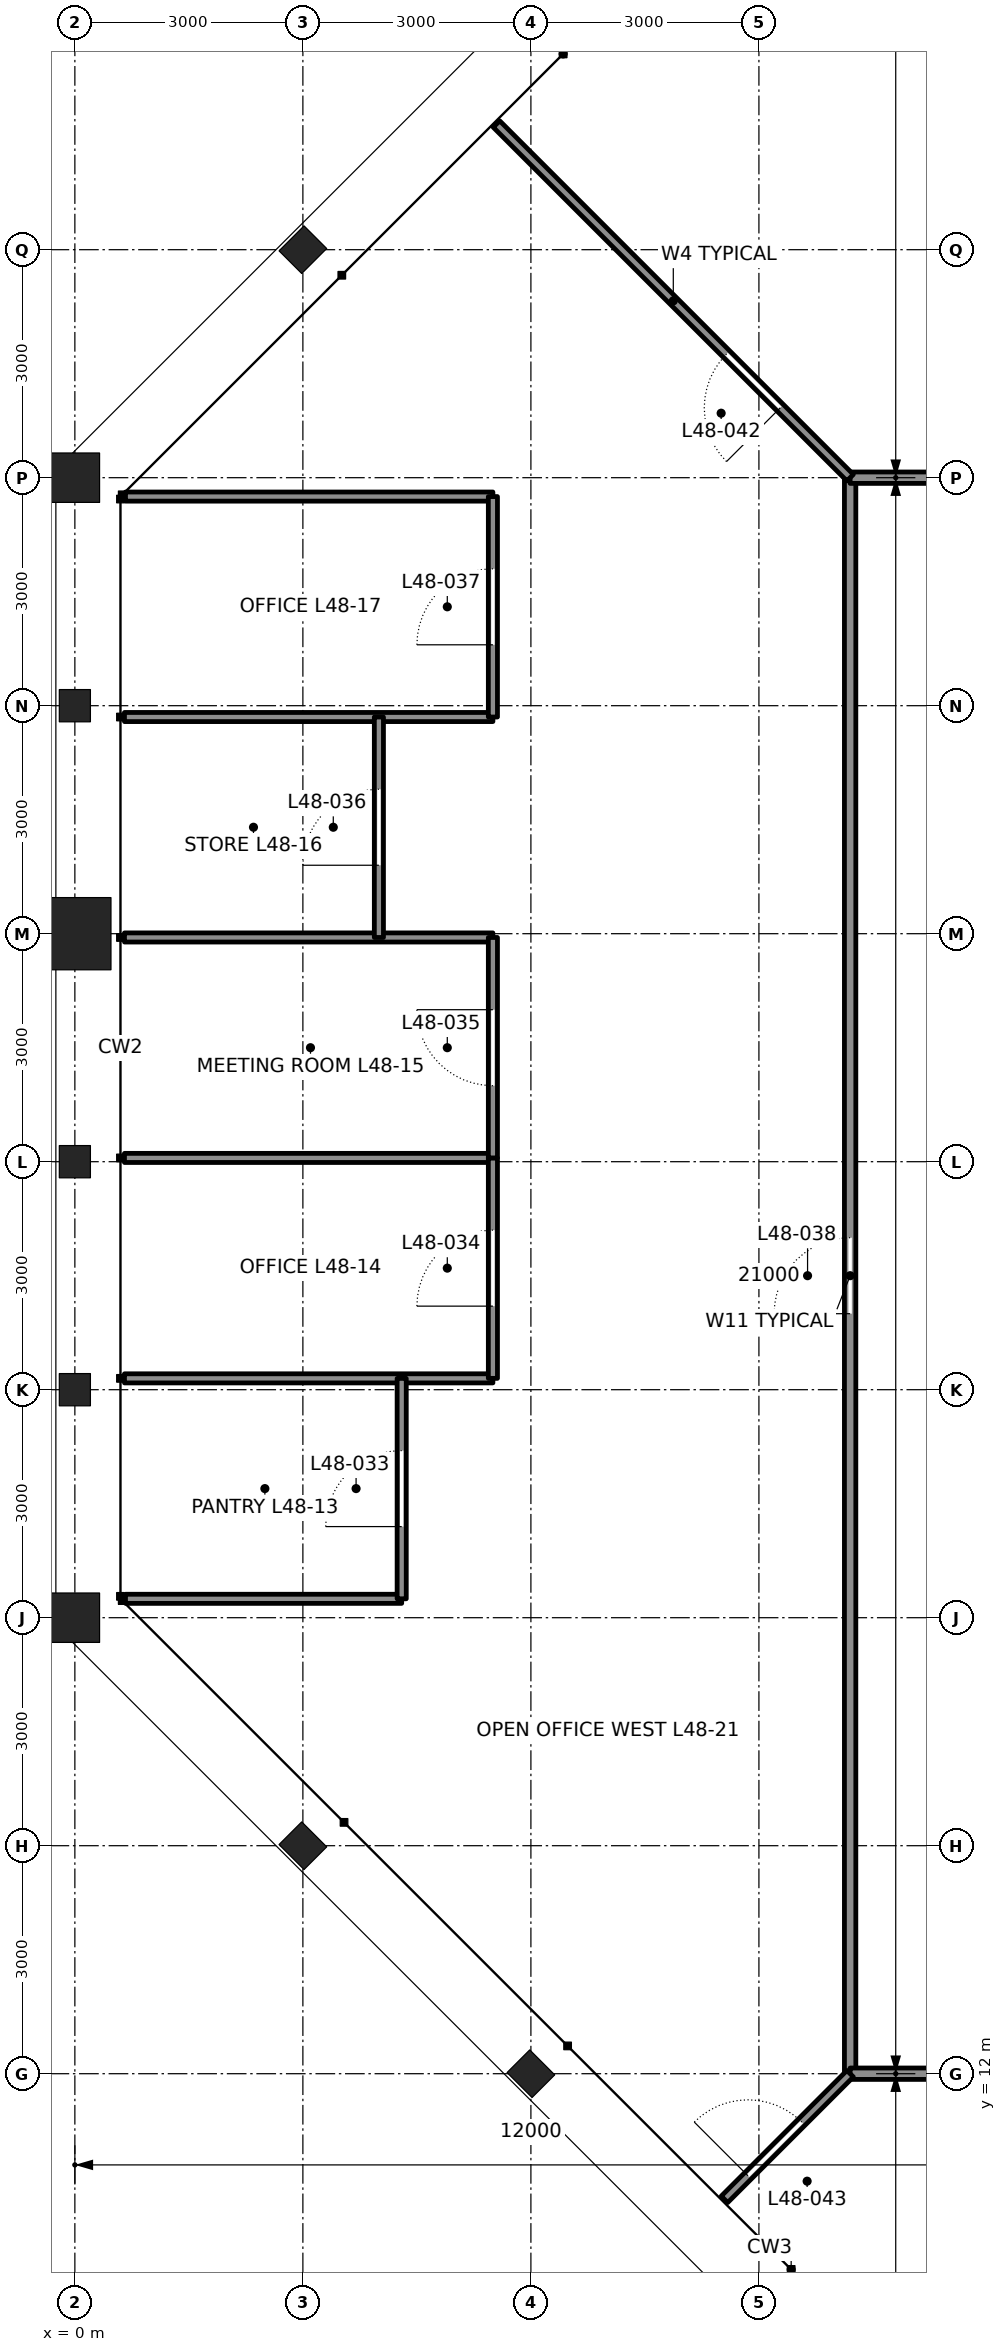
"""IFC4 building model, lengths in metres.
Left out: names, types, materials, properties, quantities, classifications, styles, units other than length and angle.
Written with IfcOpenShell. Run it as: python <this file> out.ifc"""

import sys

from ifc_helpers import new_model, si_unit, direction, frame, frame_2d, origin, origin_2d, place, context, subcontext, project, spatial, rectangle, hollow_rectangle, i_section, extrude, element, fill, save


model = new_model("IFC4")
c1 = context("Model", 3, precision=1e-05, world=origin(), true_north=direction((0.0, 1.0)))
c2 = subcontext(c1, "Body", "Model", "MODEL_VIEW")
j1 = project(units=[si_unit("LENGTHUNIT", "METRE"), si_unit("PLANEANGLEUNIT", "RADIAN")], contexts=[c1])
p1 = place(None, origin())
s1 = spatial("IfcSite", under=j1, at=p1, CompositionType="ELEMENT")
p2 = place(p1, origin())
s2 = spatial("IfcBuilding", under=s1, at=p2, CompositionType="ELEMENT")
p3 = place(p2, frame((0.0, 0.0, 218.1)))
s3 = spatial("IfcBuildingStorey", under=s2, at=p3, CompositionType="ELEMENT", Elevation=218.1)
p4 = place(p3, frame((3.0, 36.0, 0.0), z_axis=(0.0, 0.0, 1.0), x_axis=(-0.707106781187, 0.707106781187, 0.0)))
e1 = element("IfcColumn", 1, at=p4, inside=s3, PredefinedType="COLUMN", context=c2, shape_type="SweptSolid", body=[
    extrude(i_section(OverallWidth=0.422, OverallDepth=0.465, WebThickness=0.045, FlangeThickness=0.073, at=origin_2d()), origin(), (0.0, 0.0, 1.0), 4.2),
])
p5 = place(p3, frame((0.0, 33.0, 0.0), z_axis=(0.0, 0.0, 1.0), x_axis=(-1.0, 0.0, 0.0)))
e2 = element("IfcColumn", 2, at=p5, inside=s3, PredefinedType="COLUMN", context=c2, shape_type="SweptSolid", body=[
    extrude(hollow_rectangle(XDim=0.65, YDim=0.65, WallThickness=0.065, at=origin_2d()), origin(), (0.0, 0.0, 1.0), 4.2),
])
p6 = place(p3, frame((0.0, 30.0, 0.0), z_axis=(0.0, 0.0, 1.0), x_axis=(-1.0, 0.0, 0.0)))
e3 = element("IfcColumn", 3, at=p6, inside=s3, PredefinedType="COLUMN", context=c2, shape_type="SweptSolid", body=[
    extrude(i_section(OverallWidth=0.409, OverallDepth=0.424, WebThickness=0.033, FlangeThickness=0.052, at=origin_2d()), origin(), (0.0, 0.0, 1.0), 4.2),
])
p7 = place(p3, frame((0.0, 27.0, 0.0), z_axis=(0.0, 0.0, 1.0), x_axis=(-1.0, 0.0, 0.0)))
e4 = element("IfcColumn", 4, at=p7, inside=s3, PredefinedType="COLUMN", context=c2, shape_type="SweptSolid", body=[
    extrude(hollow_rectangle(XDim=0.95, YDim=0.95, WallThickness=0.11, at=origin_2d()), origin(), (0.0, 0.0, 1.0), 4.2),
])
for number, where, z_axis, x_axis in (
    (5, (0.0, 24.0, 0.0), (0.0, 0.0, 1.0), (-1.0, 0.0, 0.0)),
    (6, (0.0, 21.0, 0.0), (0.0, 0.0, 1.0), (-1.0, 0.0, 0.0)),
):
    element("IfcColumn", number, at=place(p3, frame(where, z_axis=z_axis, x_axis=x_axis)), inside=s3, PredefinedType="COLUMN", context=c2, shape_type="SweptSolid", body=[
        extrude(i_section(OverallWidth=0.409, OverallDepth=0.424, WebThickness=0.033, FlangeThickness=0.052, at=origin_2d()), origin(), (0.0, 0.0, 1.0), 4.2),
    ])
p8 = place(p3, frame((0.0, 18.0, 0.0), z_axis=(0.0, 0.0, 1.0), x_axis=(-1.0, 0.0, 0.0)))
e7 = element("IfcColumn", 7, at=p8, inside=s3, PredefinedType="COLUMN", context=c2, shape_type="SweptSolid", body=[
    extrude(hollow_rectangle(XDim=0.65, YDim=0.65, WallThickness=0.065, at=origin_2d()), origin(), (0.0, 0.0, 1.0), 4.2),
])
for number, where, z_axis, x_axis in (
    (8, (3.0, 15.0, 0.0), (0.0, 0.0, 1.0), (-0.707, -0.707, 0.0)),
    (9, (6.0, 12.0, 0.0), (0.0, 0.0, 1.0), (-0.707, -0.707, 0.0)),
):
    element("IfcColumn", number, at=place(p3, frame(where, z_axis=z_axis, x_axis=x_axis)), inside=s3, PredefinedType="COLUMN", context=c2, shape_type="SweptSolid", body=[
        extrude(i_section(OverallWidth=0.422, OverallDepth=0.465, WebThickness=0.045, FlangeThickness=0.073, at=origin_2d()), origin(), (0.0, 0.0, 1.0), 4.2),
    ])
p9 = place(p3, frame((0.666, 18.249, 0.0), z_axis=(0.0, 0.0, 1.0), x_axis=(1.0, 0.0, 0.0)))
e10 = element("IfcWall", 10, at=p9, inside=s3, PredefinedType="PARTITIONING", context=c2, shape_type="SweptSolid", body=[
    extrude(rectangle(XDim=3.634, YDim=0.12, at=frame_2d((1.817, 0.0))), origin(), (0.0, 0.0, 1.0), 4.04),
])
p10 = place(p3, frame((0.653, 21.149, 0.0), z_axis=(0.0, 0.0, 1.0), x_axis=(1.0, 0.0, 0.0)))
e11 = element("IfcWall", 11, at=p10, inside=s3, PredefinedType="PARTITIONING", context=c2, shape_type="SweptSolid", body=[
    extrude(rectangle(XDim=4.847, YDim=0.12, at=frame_2d((2.424, 0.0))), origin(), (0.0, 0.0, 1.0), 4.04),
])
for number, where, z_axis, x_axis in (
    (12, (0.653, 24.05, 0.0), (0.0, 0.0, 1.0), (1.0, 0.0, 0.0)),
    (13, (0.653, 26.95, 0.0), (0.0, 0.0, 1.0), (1.0, 0.0, 0.0)),
):
    element("IfcWall", number, at=place(p3, frame(where, z_axis=z_axis, x_axis=x_axis)), inside=s3, PredefinedType="PARTITIONING", context=c2, shape_type="SweptSolid", body=[
        extrude(rectangle(XDim=4.847, YDim=0.12, at=frame_2d((2.424, 0.0))), origin(), (0.0, 0.0, 1.0), 3.357),
    ])
p11 = place(p3, frame((0.653, 29.851, 0.0), z_axis=(0.0, 0.0, 1.0), x_axis=(1.0, 0.0, 0.0)))
e14 = element("IfcWall", 14, at=p11, inside=s3, PredefinedType="PARTITIONING", context=c2, shape_type="SweptSolid", body=[
    extrude(rectangle(XDim=4.847, YDim=0.12, at=frame_2d((2.424, 0.0))), origin(), (0.0, 0.0, 1.0), 4.04),
])
p12 = place(p3, frame((0.666, 32.751, 0.0), z_axis=(0.0, 0.0, 1.0), x_axis=(1.0, 0.0, 0.0)))
e15 = element("IfcWall", 15, at=p12, inside=s3, PredefinedType="PARTITIONING", context=c2, shape_type="SweptSolid", body=[
    extrude(rectangle(XDim=4.834, YDim=0.12, at=frame_2d((2.417, 0.0))), origin(), (0.0, 0.0, 1.0), 4.04),
])
p13 = place(p3, frame((4.3, 18.249, 0.0), z_axis=(0.0, 0.0, 1.0), x_axis=(0.0, 1.0, 0.0)))
e16 = element("IfcWall", 16, at=p13, inside=s3, PredefinedType="PARTITIONING", context=c2, shape_type="SweptSolid", body=[
    extrude(rectangle(XDim=2.901, YDim=0.12, at=frame_2d((1.45, 0.0))), origin(), (0.0, 0.0, 1.0), 4.04),
])
p14 = place(p13, frame((0.95, 0.0, 0.0)))
e17 = element("IfcOpeningElement", 17, at=p14, cuts=e16, PredefinedType="OPENING", context=c2, shape_type="SweptSolid", body=[
    extrude(rectangle(XDim=1.0, YDim=2.4, at=frame_2d((0.5, 1.2))), frame((0.0, 0.07, 0.0), z_axis=(0.0, -1.0, 0.0), x_axis=(1.0, 0.0, 0.0)), (0.0, 0.0, 1.0), 0.14),
])
p15 = place(p3, frame((5.5, 21.149, 0.0), z_axis=(0.0, 0.0, 1.0), x_axis=(0.0, 1.0, 0.0)))
e18 = element("IfcWall", 18, at=p15, inside=s3, PredefinedType="PARTITIONING", context=c2, shape_type="SweptSolid", body=[
    extrude(rectangle(XDim=2.901, YDim=0.12, at=frame_2d((1.45, 0.0))), origin(), (0.0, 0.0, 1.0), 4.04),
])
p16 = place(p15, frame((0.95, 0.0, 0.0)))
e19 = element("IfcOpeningElement", 19, at=p16, cuts=e18, PredefinedType="OPENING", context=c2, shape_type="SweptSolid", body=[
    extrude(rectangle(XDim=1.0, YDim=2.4, at=frame_2d((0.5, 1.2))), frame((0.0, 0.07, 0.0), z_axis=(0.0, -1.0, 0.0), x_axis=(1.0, 0.0, 0.0)), (0.0, 0.0, 1.0), 0.14),
])
p17 = place(p3, frame((5.5, 24.05, 0.0), z_axis=(0.0, 0.0, 1.0), x_axis=(0.0, 1.0, 0.0)))
e20 = element("IfcWall", 20, at=p17, inside=s3, PredefinedType="PARTITIONING", context=c2, shape_type="SweptSolid", body=[
    extrude(rectangle(XDim=2.9, YDim=0.12, at=frame_2d((1.45, 0.0))), origin(), (0.0, 0.0, 1.0), 4.04),
])
p18 = place(p17, frame((0.95, 0.0, 0.0)))
e21 = element("IfcOpeningElement", 21, at=p18, cuts=e20, PredefinedType="OPENING", context=c2, shape_type="SweptSolid", body=[
    extrude(rectangle(XDim=1.0, YDim=2.4, at=frame_2d((0.5, 1.2))), frame((0.0, 0.07, 0.0), z_axis=(0.0, -1.0, 0.0), x_axis=(1.0, 0.0, 0.0)), (0.0, 0.0, 1.0), 0.14),
])
p19 = place(p3, frame((4.0, 26.95, 0.0), z_axis=(0.0, 0.0, 1.0), x_axis=(0.0, 1.0, 0.0)))
e22 = element("IfcWall", 22, at=p19, inside=s3, PredefinedType="PARTITIONING", context=c2, shape_type="SweptSolid", body=[
    extrude(rectangle(XDim=2.901, YDim=0.12, at=frame_2d((1.45, 0.0))), origin(), (0.0, 0.0, 1.0), 4.04),
])
p20 = place(p19, frame((0.95, 0.0, 0.0)))
e23 = element("IfcOpeningElement", 23, at=p20, cuts=e22, PredefinedType="OPENING", context=c2, shape_type="SweptSolid", body=[
    extrude(rectangle(XDim=1.0, YDim=2.4, at=frame_2d((0.5, 1.2))), frame((0.0, 0.07, 0.0), z_axis=(0.0, -1.0, 0.0), x_axis=(1.0, 0.0, 0.0)), (0.0, 0.0, 1.0), 0.14),
])
p21 = place(p3, frame((5.5, 29.851, 0.0), z_axis=(0.0, 0.0, 1.0), x_axis=(0.0, 1.0, 0.0)))
e24 = element("IfcWall", 24, at=p21, inside=s3, PredefinedType="PARTITIONING", context=c2, shape_type="SweptSolid", body=[
    extrude(rectangle(XDim=2.901, YDim=0.12, at=frame_2d((1.45, 0.0))), origin(), (0.0, 0.0, 1.0), 4.04),
])
p22 = place(p21, frame((0.95, 0.0, 0.0)))
e25 = element("IfcOpeningElement", 25, at=p22, cuts=e24, PredefinedType="OPENING", context=c2, shape_type="SweptSolid", body=[
    extrude(rectangle(XDim=1.0, YDim=2.4, at=frame_2d((0.5, 1.2))), frame((0.0, 0.07, 0.0), z_axis=(0.0, -1.0, 0.0), x_axis=(1.0, 0.0, 0.0)), (0.0, 0.0, 1.0), 0.14),
])
p23 = place(p3, frame((10.2, 12.0, 0.0), z_axis=(0.0, 0.0, 1.0), x_axis=(0.0, 1.0, 0.0)))
e26 = element("IfcWall", 26, at=p23, inside=s3, PredefinedType="PARTITIONING", context=c2, shape_type="SweptSolid", body=[
    extrude(rectangle(XDim=21.0, YDim=0.15, at=frame_2d((10.5, 0.0))), origin(), (0.0, 0.0, 1.0), 4.04),
])
p24 = place(p23, frame((10.0, 0.0, 0.0)))
e27 = element("IfcOpeningElement", 27, at=p24, cuts=e26, PredefinedType="OPENING", context=c2, shape_type="SweptSolid", body=[
    extrude(rectangle(XDim=1.0, YDim=2.4, at=frame_2d((0.5, 1.2))), frame((0.0, 0.085, 0.0), z_axis=(0.0, -1.0, 0.0), x_axis=(1.0, 0.0, 0.0)), (0.0, 0.0, 1.0), 0.17),
])
for number, where, z_axis, x_axis in (
    (28, (10.2, 33.0, 0.0), (0.0, 0.0, 1.0), (1.0, 0.0, 0.0)),
    (29, (10.2, 12.0, 0.0), (0.0, 0.0, 1.0), (1.0, 0.0, 0.0)),
):
    element("IfcWall", number, at=place(p3, frame(where, z_axis=z_axis, x_axis=x_axis)), inside=s3, PredefinedType="PARTITIONING", context=c2, shape_type="SweptSolid", body=[
        extrude(rectangle(XDim=1.8, YDim=0.15, at=frame_2d((0.9, 0.0))), origin(), (0.0, 0.0, 1.0), 3.27),
    ])
p25 = place(p3, frame((10.2, 33.0, 0.0), z_axis=(0.0, 0.0, 1.0), x_axis=(-0.707106781187, 0.707106781187, 0.0)))
e30 = element("IfcWall", 30, at=p25, inside=s3, PredefinedType="PARTITIONING", context=c2, shape_type="SweptSolid", body=[
    extrude(rectangle(XDim=6.58, YDim=0.12, at=frame_2d((3.29, 0.0))), origin(), (0.0, 0.0, 1.0), 4.04),
])
p26 = place(p25, frame((1.3, 0.0, 0.0)))
e31 = element("IfcOpeningElement", 31, at=p26, cuts=e30, PredefinedType="OPENING", context=c2, shape_type="SweptSolid", body=[
    extrude(rectangle(XDim=1.0, YDim=2.4, at=frame_2d((0.5, 1.2))), frame((0.0, 0.07, 0.0), z_axis=(0.0, -1.0, 0.0), x_axis=(1.0, 0.0, 0.0)), (0.0, 0.0, 1.0), 0.14),
])
p27 = place(p3, frame((10.2, 12.0, 0.0), z_axis=(0.0, 0.0, 1.0), x_axis=(-0.707106781187, -0.707106781187, 0.0)))
e32 = element("IfcWall", 32, at=p27, inside=s3, PredefinedType="PARTITIONING", context=c2, shape_type="SweptSolid", body=[
    extrude(rectangle(XDim=2.338, YDim=0.12, at=frame_2d((1.169, 0.0))), origin(), (0.0, 0.0, 1.0), 4.04),
])
p28 = place(p27, frame((0.9, 0.0, 0.0)))
e33 = element("IfcOpeningElement", 33, at=p28, cuts=e32, PredefinedType="OPENING", context=c2, shape_type="SweptSolid", body=[
    extrude(rectangle(XDim=1.0, YDim=2.4, at=frame_2d((0.5, 1.2))), frame((0.0, 0.07, 0.0), z_axis=(0.0, -1.0, 0.0), x_axis=(1.0, 0.0, 0.0)), (0.0, 0.0, 1.0), 0.14),
])
p29 = place(p14, origin())
e34 = element("IfcDoor", 34, at=p29, inside=s3, OperationType="SINGLE_SWING_LEFT", PredefinedType="DOOR", context=c2, shape_type="SweptSolid", body=[
    extrude(rectangle(XDim=1.0, YDim=2.4, at=frame_2d((0.5, 1.2))), frame((0.0, 0.025, 0.0), z_axis=(0.0, -1.0, 0.0), x_axis=(1.0, 0.0, 0.0)), (0.0, 0.0, 1.0), 0.05),
])
fill(e17, e34)
p30 = place(p16, origin())
e35 = element("IfcDoor", 35, at=p30, inside=s3, OperationType="SINGLE_SWING_LEFT", PredefinedType="DOOR", context=c2, shape_type="SweptSolid", body=[
    extrude(rectangle(XDim=1.0, YDim=2.4, at=frame_2d((0.5, 1.2))), frame((0.0, 0.025, 0.0), z_axis=(0.0, -1.0, 0.0), x_axis=(1.0, 0.0, 0.0)), (0.0, 0.0, 1.0), 0.05),
])
fill(e19, e35)
p31 = place(p18, origin())
e36 = element("IfcDoor", 36, at=p31, inside=s3, OperationType="SINGLE_SWING_RIGHT", PredefinedType="DOOR", context=c2, shape_type="SweptSolid", body=[
    extrude(rectangle(XDim=1.0, YDim=2.4, at=frame_2d((0.5, 1.2))), frame((0.0, 0.025, 0.0), z_axis=(0.0, -1.0, 0.0), x_axis=(1.0, 0.0, 0.0)), (0.0, 0.0, 1.0), 0.05),
])
fill(e21, e36)
p32 = place(p20, origin())
e37 = element("IfcDoor", 37, at=p32, inside=s3, OperationType="SINGLE_SWING_LEFT", PredefinedType="DOOR", context=c2, shape_type="SweptSolid", body=[
    extrude(rectangle(XDim=1.0, YDim=2.4, at=frame_2d((0.5, 1.2))), frame((0.0, 0.025, 0.0), z_axis=(0.0, -1.0, 0.0), x_axis=(1.0, 0.0, 0.0)), (0.0, 0.0, 1.0), 0.05),
])
fill(e23, e37)
p33 = place(p22, origin())
e38 = element("IfcDoor", 38, at=p33, inside=s3, OperationType="SINGLE_SWING_LEFT", PredefinedType="DOOR", context=c2, shape_type="SweptSolid", body=[
    extrude(rectangle(XDim=1.0, YDim=2.4, at=frame_2d((0.5, 1.2))), frame((0.0, 0.025, 0.0), z_axis=(0.0, -1.0, 0.0), x_axis=(1.0, 0.0, 0.0)), (0.0, 0.0, 1.0), 0.05),
])
fill(e25, e38)
p34 = place(p24, origin())
e39 = element("IfcDoor", 39, at=p34, inside=s3, OperationType="SINGLE_SWING_LEFT", PredefinedType="DOOR", context=c2, shape_type="SweptSolid", body=[
    extrude(rectangle(XDim=1.0, YDim=2.4, at=frame_2d((0.5, 1.2))), frame((0.0, 0.025, 0.0), z_axis=(0.0, -1.0, 0.0), x_axis=(1.0, 0.0, 0.0)), (0.0, 0.0, 1.0), 0.05),
])
fill(e27, e39)
p35 = place(p26, origin())
e40 = element("IfcDoor", 40, at=p35, inside=s3, OperationType="SINGLE_SWING_LEFT", PredefinedType="DOOR", context=c2, shape_type="SweptSolid", body=[
    extrude(rectangle(XDim=1.0, YDim=2.4, at=frame_2d((0.5, 1.2))), frame((0.0, 0.025, 0.0), z_axis=(0.0, -1.0, 0.0), x_axis=(1.0, 0.0, 0.0)), (0.0, 0.0, 1.0), 0.05),
])
fill(e31, e40)
p36 = place(p28, frame((1.0, 0.0, 0.0), z_axis=(0.0, 0.0, 1.0), x_axis=(-1.0, 0.0, 0.0)))
e41 = element("IfcDoor", 41, at=p36, inside=s3, OperationType="SINGLE_SWING_LEFT", PredefinedType="DOOR", context=c2, shape_type="SweptSolid", body=[
    extrude(rectangle(XDim=1.0, YDim=2.4, at=frame_2d((0.5, 1.2))), frame((0.0, 0.025, 0.0), z_axis=(0.0, -1.0, 0.0), x_axis=(1.0, 0.0, 0.0)), (0.0, 0.0, 1.0), 0.05),
])
fill(e33, e41)
save(model, sys.argv[1])
